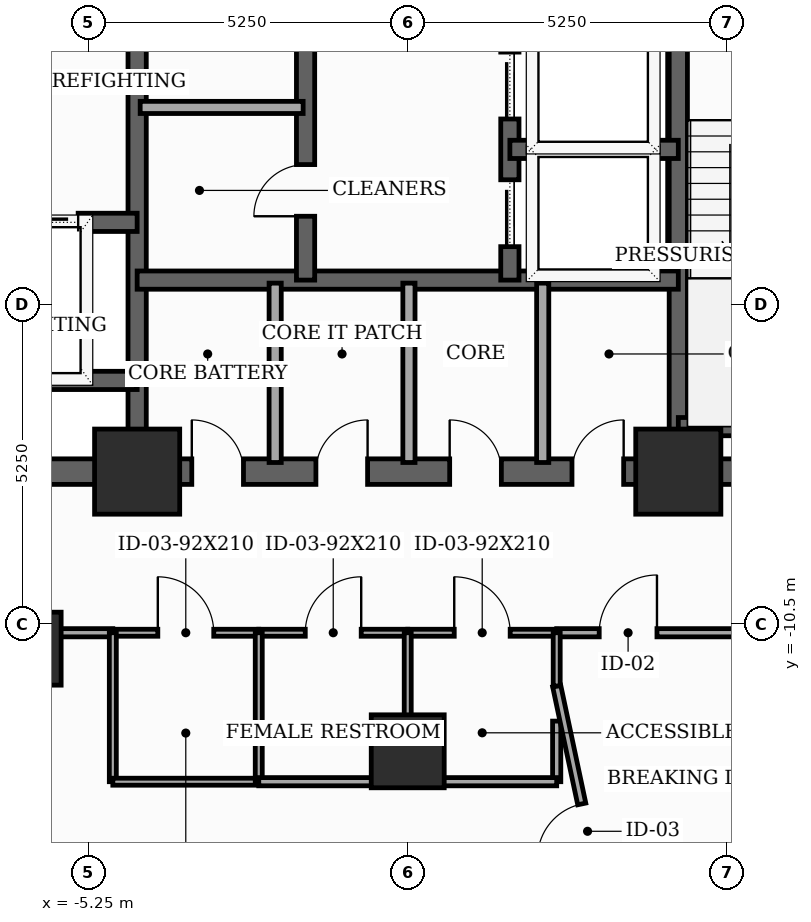
"""IFC4 building model, lengths in metres.
Left out: names, types, materials, properties, quantities, classifications, styles, units other than length and angle.
Written with IfcOpenShell. Run it as: python <this file> out.ifc"""

import sys

from ifc_helpers import new_model, si_unit, direction, frame, frame_2d, origin, origin_2d, place, context, subcontext, project, spatial, rectangle, extrude, element, fill, save


model = new_model("IFC4")
c1 = context("Model", 3, precision=1e-05, world=origin(), true_north=direction((0.0, 1.0)))
c2 = subcontext(c1, "Body", "Model", "MODEL_VIEW")
j1 = project(units=[si_unit("LENGTHUNIT", "METRE"), si_unit("PLANEANGLEUNIT", "RADIAN")], contexts=[c1])
p1 = place(None, origin())
s1 = spatial("IfcSite", under=j1, at=p1, CompositionType="ELEMENT")
p2 = place(p1, origin())
s2 = spatial("IfcBuilding", under=s1, at=p2, CompositionType="ELEMENT")
p3 = place(p2, frame((0.0, 0.0, 145.8)))
s3 = spatial("IfcBuildingStorey", under=s2, at=p3, CompositionType="ELEMENT", Elevation=145.8)
for number, where, z_axis, x_axis in (
    (1, (-4.45, -8.0, 0.0), (0.0, 0.0, 1.0), (1.0, 0.0, 0.0)),
    (2, (4.45, -8.0, 0.0), (0.0, 0.0, 1.0), (1.0, 0.0, 0.0)),
):
    element("IfcColumn", number, at=place(p3, frame(where, z_axis=z_axis, x_axis=x_axis)), inside=s3, PredefinedType="COLUMN", context=c2, shape_type="SweptSolid", body=[
        extrude(rectangle(XDim=1.4, YDim=1.4, at=origin_2d()), origin(), (0.0, 0.0, 1.0), 3.7),
    ])
for number, where, z_axis, x_axis in (
    (3, (-6.3, -10.912, 0.0), (0.0, 0.0, 1.0), (1.0, 0.0, 0.0)),
    (4, (0.0, -12.6, 0.0), (0.0, 0.0, 1.0), (1.0, 0.0, 0.0)),
):
    element("IfcColumn", number, at=place(p3, frame(where, z_axis=z_axis, x_axis=x_axis)), inside=s3, PredefinedType="COLUMN", context=c2, shape_type="SweptSolid", body=[
        extrude(rectangle(XDim=1.2, YDim=1.2, at=origin_2d()), origin(), (0.0, 0.0, 1.0), 3.7),
    ])
p4 = place(p3, frame((-8.0, -8.0, 0.0), z_axis=(0.0, 0.0, 1.0), x_axis=(1.0, 0.0, 0.0)))
e5 = element("IfcWall", 5, at=p4, inside=s3, PredefinedType="SHEAR", context=c2, shape_type="SweptSolid", body=[
    extrude(rectangle(XDim=16.0, YDim=0.42, at=frame_2d((8.0, 0.0))), origin(), (0.0, 0.0, 1.0), 3.46),
])
p5 = place(p4, frame((4.449, 0.0, 0.0)))
e6 = element("IfcOpeningElement", 6, at=p5, cuts=e5, PredefinedType="OPENING", context=c2, shape_type="SweptSolid", body=[
    extrude(rectangle(XDim=0.85, YDim=2.02, at=frame_2d((0.425, 1.01))), frame((0.0, 0.22, 0.0), z_axis=(0.0, -1.0, 0.0), x_axis=(1.0, 0.0, 0.0)), (0.0, 0.0, 1.0), 0.44),
])
p6 = place(p4, frame((6.49, 0.0, 0.0)))
e7 = element("IfcOpeningElement", 7, at=p6, cuts=e5, PredefinedType="OPENING", context=c2, shape_type="SweptSolid", body=[
    extrude(rectangle(XDim=0.85, YDim=2.02, at=frame_2d((0.425, 1.01))), frame((0.0, 0.22, 0.0), z_axis=(0.0, -1.0, 0.0), x_axis=(1.0, 0.0, 0.0)), (0.0, 0.0, 1.0), 0.44),
])
p7 = place(p4, frame((8.69, 0.0, 0.0)))
e8 = element("IfcOpeningElement", 8, at=p7, cuts=e5, PredefinedType="OPENING", context=c2, shape_type="SweptSolid", body=[
    extrude(rectangle(XDim=0.85, YDim=2.02, at=frame_2d((0.425, 1.01))), frame((0.0, 0.22, 0.0), z_axis=(0.0, -1.0, 0.0), x_axis=(1.0, 0.0, 0.0)), (0.0, 0.0, 1.0), 0.44),
])
p8 = place(p4, frame((10.701, 0.0, 0.0)))
e9 = element("IfcOpeningElement", 9, at=p8, cuts=e5, PredefinedType="OPENING", context=c2, shape_type="SweptSolid", body=[
    extrude(rectangle(XDim=0.85, YDim=2.02, at=frame_2d((0.425, 1.01))), frame((0.0, 0.22, 0.0), z_axis=(0.0, -1.0, 0.0), x_axis=(1.0, 0.0, 0.0)), (0.0, 0.0, 1.0), 0.44),
])
for number, where, z_axis, x_axis in (
    (10, (-4.45, -7.79, 0.0), (0.0, 0.0, 1.0), (0.0, 1.0, 0.0)),
    (11, (4.45, -7.79, 0.0), (0.0, 0.0, 1.0), (0.0, 1.0, 0.0)),
):
    element("IfcWall", number, at=place(p3, frame(where, z_axis=z_axis, x_axis=x_axis)), inside=s3, PredefinedType="SHEAR", context=c2, shape_type="SweptSolid", body=[
        extrude(rectangle(XDim=15.58, YDim=0.3, at=frame_2d((7.79, 0.0))), origin(), (0.0, 0.0, 1.0), 3.46),
    ])
p9 = place(p3, frame((4.45, -7.26, 0.0), z_axis=(0.0, 0.0, 1.0), x_axis=(1.0, 0.0, 0.0)))
e12 = element("IfcWall", 12, at=p9, inside=s3, PredefinedType="SHEAR", context=c2, shape_type="SweptSolid", body=[
    extrude(rectangle(XDim=3.55, YDim=0.3, at=frame_2d((1.775, 0.0))), origin(), (0.0, 0.0, 1.0), 3.46),
])
p10 = place(p3, frame((-7.79, -3.9, 0.0), z_axis=(0.0, 0.0, 1.0), x_axis=(1.0, 0.0, 0.0)))
e13 = element("IfcWall", 13, at=p10, inside=s3, PredefinedType="SHEAR", context=c2, shape_type="SweptSolid", body=[
    extrude(rectangle(XDim=3.34, YDim=0.3, at=frame_2d((1.67, 0.0))), origin(), (0.0, 0.0, 1.0), 3.46),
])
p11 = place(p10, frame((1.27, 0.0, 0.0)))
e14 = element("IfcOpeningElement", 14, at=p11, cuts=e13, PredefinedType="OPENING", context=c2, shape_type="SweptSolid", body=[
    extrude(rectangle(XDim=1.1, YDim=2.1, at=frame_2d((0.55, 1.05))), frame((0.0, 0.16, 0.0), z_axis=(0.0, -1.0, 0.0), x_axis=(1.0, 0.0, 0.0)), (0.0, 0.0, 1.0), 0.32),
])
p12 = place(p3, frame((-7.79, -6.5, 0.0), z_axis=(0.0, 0.0, 1.0), x_axis=(1.0, 0.0, 0.0)))
e15 = element("IfcWall", 15, at=p12, inside=s3, PredefinedType="SHEAR", context=c2, shape_type="SweptSolid", body=[
    extrude(rectangle(XDim=3.34, YDim=0.3, at=frame_2d((1.67, 0.0))), origin(), (0.0, 0.0, 1.0), 3.46),
])
p13 = place(p3, frame((-4.45, -4.85, 0.0), z_axis=(0.0, 0.0, 1.0), x_axis=(1.0, 0.0, 0.0)))
e16 = element("IfcWall", 16, at=p13, inside=s3, PredefinedType="SHEAR", context=c2, shape_type="SweptSolid", body=[
    extrude(rectangle(XDim=8.9, YDim=0.3, at=frame_2d((4.45, 0.0))), origin(), (0.0, 0.0, 1.0), 3.46),
])
p14 = place(p3, frame((-1.68, -4.85, 0.0), z_axis=(0.0, 0.0, 1.0), x_axis=(0.0, 1.0, 0.0)))
e17 = element("IfcWall", 17, at=p14, inside=s3, PredefinedType="SHEAR", context=c2, shape_type="SweptSolid", body=[
    extrude(rectangle(XDim=12.64, YDim=0.3, at=frame_2d((6.32, 0.0))), origin(), (0.0, 0.0, 1.0), 3.46),
])
p15 = place(p14, frame((1.05, 0.0, 0.0)))
e18 = element("IfcOpeningElement", 18, at=p15, cuts=e17, PredefinedType="OPENING", context=c2, shape_type="SweptSolid", body=[
    extrude(rectangle(XDim=0.85, YDim=2.02, at=frame_2d((0.425, 1.01))), frame((0.0, 0.16, 0.0), z_axis=(0.0, -1.0, 0.0), x_axis=(1.0, 0.0, 0.0)), (0.0, 0.0, 1.0), 0.32),
])
p16 = place(p14, frame((6.8, 0.0, 0.0)))
e19 = element("IfcOpeningElement", 19, at=p16, cuts=e17, PredefinedType="OPENING", context=c2, shape_type="SweptSolid", body=[
    extrude(rectangle(XDim=0.95, YDim=2.1, at=frame_2d((0.475, 1.05))), frame((0.0, 0.16, 0.0), z_axis=(0.0, -1.0, 0.0), x_axis=(1.0, 0.0, 0.0)), (0.0, 0.0, 1.0), 0.32),
])
p17 = place(p3, frame((1.68, -4.85, 0.0), z_axis=(0.0, 0.0, 1.0), x_axis=(0.0, 1.0, 0.0)))
e20 = element("IfcWall", 20, at=p17, inside=s3, PredefinedType="SHEAR", context=c2, shape_type="SweptSolid", body=[
    extrude(rectangle(XDim=12.64, YDim=0.3, at=frame_2d((6.32, 0.0))), origin(), (0.0, 0.0, 1.0), 3.46),
])
p18 = place(p17, frame((0.55, 0.0, 0.0)))
e21 = element("IfcOpeningElement", 21, at=p18, cuts=e20, PredefinedType="OPENING", context=c2, shape_type="SweptSolid", body=[
    extrude(rectangle(XDim=1.1, YDim=2.1, at=frame_2d((0.55, 1.05))), frame((0.0, 0.16, 0.0), z_axis=(0.0, -1.0, 0.0), x_axis=(1.0, 0.0, 0.0)), (0.0, 0.0, 1.0), 0.32),
])
p19 = place(p17, frame((2.65, 0.0, 0.0)))
e22 = element("IfcOpeningElement", 22, at=p19, cuts=e20, PredefinedType="OPENING", context=c2, shape_type="SweptSolid", body=[
    extrude(rectangle(XDim=1.1, YDim=2.1, at=frame_2d((0.55, 1.05))), frame((0.0, 0.16, 0.0), z_axis=(0.0, -1.0, 0.0), x_axis=(1.0, 0.0, 0.0)), (0.0, 0.0, 1.0), 0.32),
])
p20 = place(p17, frame((4.75, 0.0, 0.0)))
e23 = element("IfcOpeningElement", 23, at=p20, cuts=e20, PredefinedType="OPENING", context=c2, shape_type="SweptSolid", body=[
    extrude(rectangle(XDim=1.1, YDim=2.1, at=frame_2d((0.55, 1.05))), frame((0.0, 0.16, 0.0), z_axis=(0.0, -1.0, 0.0), x_axis=(1.0, 0.0, 0.0)), (0.0, 0.0, 1.0), 0.32),
])
p21 = place(p17, frame((6.85, 0.0, 0.0)))
e24 = element("IfcOpeningElement", 24, at=p21, cuts=e20, PredefinedType="OPENING", context=c2, shape_type="SweptSolid", body=[
    extrude(rectangle(XDim=1.1, YDim=2.1, at=frame_2d((0.55, 1.05))), frame((0.0, 0.16, 0.0), z_axis=(0.0, -1.0, 0.0), x_axis=(1.0, 0.0, 0.0)), (0.0, 0.0, 1.0), 0.32),
])
p22 = place(p17, frame((8.95, 0.0, 0.0)))
e25 = element("IfcOpeningElement", 25, at=p22, cuts=e20, PredefinedType="OPENING", context=c2, shape_type="SweptSolid", body=[
    extrude(rectangle(XDim=1.1, YDim=2.1, at=frame_2d((0.55, 1.05))), frame((0.0, 0.16, 0.0), z_axis=(0.0, -1.0, 0.0), x_axis=(1.0, 0.0, 0.0)), (0.0, 0.0, 1.0), 0.32),
])
p23 = place(p17, frame((11.05, 0.0, 0.0)))
e26 = element("IfcOpeningElement", 26, at=p23, cuts=e20, PredefinedType="OPENING", context=c2, shape_type="SweptSolid", body=[
    extrude(rectangle(XDim=1.1, YDim=2.1, at=frame_2d((0.55, 1.05))), frame((0.0, 0.16, 0.0), z_axis=(0.0, -1.0, 0.0), x_axis=(1.0, 0.0, 0.0)), (0.0, 0.0, 1.0), 0.32),
])
p24 = place(p3, frame((1.68, -2.7, 0.0), z_axis=(0.0, 0.0, 1.0), x_axis=(1.0, 0.0, 0.0)))
e27 = element("IfcWall", 27, at=p24, inside=s3, PredefinedType="SHEAR", context=c2, shape_type="SweptSolid", body=[
    extrude(rectangle(XDim=2.77, YDim=0.3, at=frame_2d((1.385, 0.0))), origin(), (0.0, 0.0, 1.0), 3.46),
])
for number, where, z_axis, x_axis in (
    (28, (-2.18, -7.85, 0.0), (0.0, 0.0, 1.0), (0.0, 1.0, 0.0)),
    (29, (0.02, -7.85, 0.0), (0.0, 0.0, 1.0), (0.0, 1.0, 0.0)),
    (30, (2.22, -7.85, 0.0), (0.0, 0.0, 1.0), (0.0, 1.0, 0.0)),
):
    element("IfcWall", number, at=place(p3, frame(where, z_axis=z_axis, x_axis=x_axis)), inside=s3, PredefinedType="SOLIDWALL", context=c2, shape_type="SweptSolid", body=[
        extrude(rectangle(XDim=2.95, YDim=0.2, at=frame_2d((1.475, 0.0))), origin(), (0.0, 0.0, 1.0), 2.845),
    ])
p25 = place(p3, frame((-4.4, -2.01, 0.0), z_axis=(0.0, 0.0, 1.0), x_axis=(1.0, 0.0, 0.0)))
e31 = element("IfcWall", 31, at=p25, inside=s3, PredefinedType="SOLIDWALL", context=c2, shape_type="SweptSolid", body=[
    extrude(rectangle(XDim=2.68, YDim=0.2, at=frame_2d((1.34, 0.0))), origin(), (0.0, 0.0, 1.0), 3.46),
])
p26 = place(p3, frame((-4.85, -10.65, 0.0), z_axis=(0.0, 0.0, 1.0), x_axis=(1.0, 0.0, 0.0)))
e32 = element("IfcWall", 32, at=p26, inside=s3, PredefinedType="PARTITIONING", context=c2, shape_type="SweptSolid", body=[
    extrude(rectangle(XDim=2.4, YDim=0.115, at=frame_2d((1.2, 0.0))), origin(), (0.0, 0.0, 1.0), 3.46),
])
p27 = place(p26, frame((0.74, 0.0, 0.0)))
e33 = element("IfcOpeningElement", 33, at=p27, cuts=e32, PredefinedType="OPENING", context=c2, shape_type="SweptSolid", body=[
    extrude(rectangle(XDim=0.92, YDim=2.1, at=frame_2d((0.46, 1.05))), frame((0.0, 0.067, 0.0), z_axis=(0.0, -1.0, 0.0), x_axis=(1.0, 0.0, 0.0)), (0.0, 0.0, 1.0), 0.135),
])
p28 = place(p3, frame((-6.149, -10.65, 0.0), z_axis=(0.0, 0.0, 1.0), x_axis=(1.0, 0.0, 0.0)))
e34 = element("IfcWall", 34, at=p28, inside=s3, PredefinedType="PARTITIONING", context=c2, shape_type="SweptSolid", body=[
    extrude(rectangle(XDim=1.299, YDim=0.135, at=frame_2d((0.649, 0.0))), origin(), (0.0, 0.0, 1.0), 3.46),
])
p29 = place(p3, frame((-2.45, -10.65, 0.0), z_axis=(0.0, 0.0, 1.0), x_axis=(1.0, 0.0, 0.0)))
e35 = element("IfcWall", 35, at=p29, inside=s3, PredefinedType="PARTITIONING", context=c2, shape_type="SweptSolid", body=[
    extrude(rectangle(XDim=2.45, YDim=0.115, at=frame_2d((1.225, 0.0))), origin(), (0.0, 0.0, 1.0), 2.745),
])
p30 = place(p29, frame((0.765, 0.0, 0.0)))
e36 = element("IfcOpeningElement", 36, at=p30, cuts=e35, PredefinedType="OPENING", context=c2, shape_type="SweptSolid", body=[
    extrude(rectangle(XDim=0.92, YDim=2.1, at=frame_2d((0.46, 1.05))), frame((0.0, 0.067, 0.0), z_axis=(0.0, -1.0, 0.0), x_axis=(1.0, 0.0, 0.0)), (0.0, 0.0, 1.0), 0.135),
])
p31 = place(p3, frame((0.0, -10.65, 0.0), z_axis=(0.0, 0.0, 1.0), x_axis=(1.0, 0.0, 0.0)))
e37 = element("IfcWall", 37, at=p31, inside=s3, PredefinedType="PARTITIONING", context=c2, shape_type="SweptSolid", body=[
    extrude(rectangle(XDim=2.45, YDim=0.115, at=frame_2d((1.225, 0.0))), origin(), (0.0, 0.0, 1.0), 3.46),
])
p32 = place(p31, frame((0.765, 0.0, 0.0)))
e38 = element("IfcOpeningElement", 38, at=p32, cuts=e37, PredefinedType="OPENING", context=c2, shape_type="SweptSolid", body=[
    extrude(rectangle(XDim=0.92, YDim=2.1, at=frame_2d((0.46, 1.05))), frame((0.0, 0.067, 0.0), z_axis=(0.0, -1.0, 0.0), x_axis=(1.0, 0.0, 0.0)), (0.0, 0.0, 1.0), 0.135),
])
p33 = place(p3, frame((2.45, -10.65, 0.0), z_axis=(0.0, 0.0, 1.0), x_axis=(1.0, 0.0, 0.0)))
e39 = element("IfcWall", 39, at=p33, inside=s3, PredefinedType="PARTITIONING", context=c2, shape_type="SweptSolid", body=[
    extrude(rectangle(XDim=5.871, YDim=0.135, at=frame_2d((2.936, 0.0))), origin(), (0.0, 0.0, 1.0), 2.045),
])
p34 = place(p33, frame((0.699, 0.0, 0.0)))
e40 = element("IfcOpeningElement", 40, at=p34, cuts=e39, PredefinedType="OPENING", context=c2, shape_type="SweptSolid", body=[
    extrude(rectangle(XDim=0.95, YDim=2.0, at=frame_2d((0.475, 1.0))), frame((0.0, 0.077, 0.0), z_axis=(0.0, -1.0, 0.0), x_axis=(1.0, 0.0, 0.0)), (0.0, 0.0, 1.0), 0.155),
])
p35 = place(p3, frame((-2.472, -15.605, 0.0), z_axis=(0.0, 0.0, 1.0), x_axis=(-0.938218989818, 0.34604208869, 0.0)))
e41 = element("IfcWall", 41, at=p35, inside=s3, PredefinedType="PARTITIONING", context=c2, shape_type="SweptSolid", body=[
    extrude(rectangle(XDim=5.745, YDim=0.135, at=frame_2d((2.873, 0.0))), origin(), (0.0, 0.0, 1.0), 3.46),
])
p36 = place(p3, frame((-4.85, -10.65, 0.0), z_axis=(0.0, 0.0, 1.0), x_axis=(0.0, -1.0, 0.0)))
e42 = element("IfcWall", 42, at=p36, inside=s3, PredefinedType="PARTITIONING", context=c2, shape_type="SweptSolid", body=[
    extrude(rectangle(XDim=2.45, YDim=0.115, at=frame_2d((1.225, 0.0))), origin(), (0.0, 0.0, 1.0), 2.745),
])
p37 = place(p3, frame((-4.85, -13.1, 0.0), z_axis=(0.0, 0.0, 1.0), x_axis=(1.0, 0.0, 0.0)))
e43 = element("IfcWall", 43, at=p37, inside=s3, PredefinedType="PARTITIONING", context=c2, shape_type="SweptSolid", body=[
    extrude(rectangle(XDim=2.4, YDim=0.115, at=frame_2d((1.2, 0.0))), origin(), (0.0, 0.0, 1.0), 3.46),
])
p38 = place(p3, frame((-2.45, -13.1, 0.0), z_axis=(0.0, 0.0, 1.0), x_axis=(0.0, 1.0, 0.0)))
e44 = element("IfcWall", 44, at=p38, inside=s3, PredefinedType="PARTITIONING", context=c2, shape_type="SweptSolid", body=[
    extrude(rectangle(XDim=2.45, YDim=0.115, at=frame_2d((1.225, 0.0))), origin(), (0.0, 0.0, 1.0), 2.745),
])
p39 = place(p3, frame((0.0, -13.1, 0.0), z_axis=(0.0, 0.0, 1.0), x_axis=(-1.0, 0.0, 0.0)))
e45 = element("IfcWall", 45, at=p39, inside=s3, PredefinedType="PARTITIONING", context=c2, shape_type="SweptSolid", body=[
    extrude(rectangle(XDim=2.45, YDim=0.135, at=frame_2d((1.225, 0.0))), origin(), (0.0, 0.0, 1.0), 2.045),
])
p40 = place(p3, frame((2.45, -12.103, 0.0), z_axis=(0.0, 0.0, 1.0), x_axis=(0.0, -1.0, 0.0)))
e46 = element("IfcWall", 46, at=p40, inside=s3, PredefinedType="PARTITIONING", context=c2, shape_type="SweptSolid", body=[
    extrude(rectangle(XDim=0.997, YDim=0.135, at=frame_2d((0.499, 0.0))), origin(), (0.0, 0.0, 1.0), 2.745),
])
p41 = place(p3, frame((2.45, -13.1, 0.0), z_axis=(0.0, 0.0, 1.0), x_axis=(-1.0, 0.0, 0.0)))
e47 = element("IfcWall", 47, at=p41, inside=s3, PredefinedType="PARTITIONING", context=c2, shape_type="SweptSolid", body=[
    extrude(rectangle(XDim=2.45, YDim=0.135, at=frame_2d((1.225, 0.0))), origin(), (0.0, 0.0, 1.0), 2.045),
])
p42 = place(p3, frame((3.269, -15.38, 0.0), z_axis=(0.0, 0.0, 1.0), x_axis=(-0.207886916666, 0.978152866314, 0.0)))
e48 = element("IfcWall", 48, at=p42, inside=s3, PredefinedType="PARTITIONING", context=c2, shape_type="SweptSolid", body=[
    extrude(rectangle(XDim=3.94, YDim=0.135, at=frame_2d((1.97, 0.0))), origin(), (0.0, 0.0, 1.0), 2.045),
])
p43 = place(p42, frame((1.037, 0.0, 0.0)))
e49 = element("IfcOpeningElement", 49, at=p43, cuts=e48, PredefinedType="OPENING", context=c2, shape_type="SweptSolid", body=[
    extrude(rectangle(XDim=0.92, YDim=2.0, at=frame_2d((0.46, 1.0))), frame((0.0, 0.077, 0.0), z_axis=(0.0, -1.0, 0.0), x_axis=(1.0, 0.0, 0.0)), (0.0, 0.0, 1.0), 0.155),
])
p44 = place(p3, frame((0.0, -13.1, 0.0), z_axis=(0.0, 0.0, 1.0), x_axis=(0.0, 1.0, 0.0)))
e50 = element("IfcWall", 50, at=p44, inside=s3, PredefinedType="PARTITIONING", context=c2, shape_type="SweptSolid", body=[
    extrude(rectangle(XDim=2.45, YDim=0.115, at=frame_2d((1.225, 0.0))), origin(), (0.0, 0.0, 1.0), 2.045),
])
p45 = place(p3, frame((2.45, -11.526, 0.0), z_axis=(0.0, 0.0, 1.0), x_axis=(0.0, 1.0, 0.0)))
e51 = element("IfcWall", 51, at=p45, inside=s3, PredefinedType="PARTITIONING", context=c2, shape_type="SweptSolid", body=[
    extrude(rectangle(XDim=0.876, YDim=0.115, at=frame_2d((0.438, 0.0))), origin(), (0.0, 0.0, 1.0), 3.46),
])
p46 = place(p5, origin())
e52 = element("IfcDoor", 52, at=p46, inside=s3, OperationType="SINGLE_SWING_LEFT", PredefinedType="TRAPDOOR", context=c2, shape_type="SweptSolid", body=[
    extrude(rectangle(XDim=0.85, YDim=2.02, at=frame_2d((0.425, 1.01))), frame((0.0, 0.025, 0.0), z_axis=(0.0, -1.0, 0.0), x_axis=(1.0, 0.0, 0.0)), (0.0, 0.0, 1.0), 0.05),
])
fill(e6, e52)
p47 = place(p6, origin())
e53 = element("IfcDoor", 53, at=p47, inside=s3, OperationType="SINGLE_SWING_RIGHT", PredefinedType="TRAPDOOR", context=c2, shape_type="SweptSolid", body=[
    extrude(rectangle(XDim=0.85, YDim=2.02, at=frame_2d((0.425, 1.01))), frame((0.0, 0.025, 0.0), z_axis=(0.0, -1.0, 0.0), x_axis=(1.0, 0.0, 0.0)), (0.0, 0.0, 1.0), 0.05),
])
fill(e7, e53)
p48 = place(p7, origin())
e54 = element("IfcDoor", 54, at=p48, inside=s3, OperationType="SINGLE_SWING_LEFT", PredefinedType="TRAPDOOR", context=c2, shape_type="SweptSolid", body=[
    extrude(rectangle(XDim=0.85, YDim=2.02, at=frame_2d((0.425, 1.01))), frame((0.0, 0.025, 0.0), z_axis=(0.0, -1.0, 0.0), x_axis=(1.0, 0.0, 0.0)), (0.0, 0.0, 1.0), 0.05),
])
fill(e8, e54)
p49 = place(p8, origin())
e55 = element("IfcDoor", 55, at=p49, inside=s3, OperationType="SINGLE_SWING_RIGHT", PredefinedType="TRAPDOOR", context=c2, shape_type="SweptSolid", body=[
    extrude(rectangle(XDim=0.85, YDim=2.02, at=frame_2d((0.425, 1.01))), frame((0.0, 0.025, 0.0), z_axis=(0.0, -1.0, 0.0), x_axis=(1.0, 0.0, 0.0)), (0.0, 0.0, 1.0), 0.05),
])
fill(e9, e55)
p50 = place(p11, origin())
e56 = element("IfcDoor", 56, at=p50, inside=s3, OperationType="SLIDING_TO_LEFT", PredefinedType="DOOR", context=c2, shape_type="SweptSolid", body=[
    extrude(rectangle(XDim=1.1, YDim=2.1, at=frame_2d((0.55, 1.05))), frame((0.0, 0.025, 0.0), z_axis=(0.0, -1.0, 0.0), x_axis=(1.0, 0.0, 0.0)), (0.0, 0.0, 1.0), 0.05),
])
fill(e14, e56)
p51 = place(p15, origin())
e57 = element("IfcDoor", 57, at=p51, inside=s3, OperationType="SINGLE_SWING_LEFT", PredefinedType="TRAPDOOR", context=c2, shape_type="SweptSolid", body=[
    extrude(rectangle(XDim=0.85, YDim=2.02, at=frame_2d((0.425, 1.01))), frame((0.0, 0.025, 0.0), z_axis=(0.0, -1.0, 0.0), x_axis=(1.0, 0.0, 0.0)), (0.0, 0.0, 1.0), 0.05),
])
fill(e18, e57)
p52 = place(p18, origin())
e58 = element("IfcDoor", 58, at=p52, inside=s3, OperationType="SLIDING_TO_LEFT", PredefinedType="DOOR", context=c2, shape_type="SweptSolid", body=[
    extrude(rectangle(XDim=1.1, YDim=2.1, at=frame_2d((0.55, 1.05))), frame((0.0, 0.025, 0.0), z_axis=(0.0, -1.0, 0.0), x_axis=(1.0, 0.0, 0.0)), (0.0, 0.0, 1.0), 0.05),
])
fill(e21, e58)
p53 = place(p19, origin())
e59 = element("IfcDoor", 59, at=p53, inside=s3, OperationType="SLIDING_TO_LEFT", PredefinedType="DOOR", context=c2, shape_type="SweptSolid", body=[
    extrude(rectangle(XDim=1.1, YDim=2.1, at=frame_2d((0.55, 1.05))), frame((0.0, 0.025, 0.0), z_axis=(0.0, -1.0, 0.0), x_axis=(1.0, 0.0, 0.0)), (0.0, 0.0, 1.0), 0.05),
])
fill(e22, e59)
p54 = place(p27, origin())
e60 = element("IfcDoor", 60, at=p54, inside=s3, OperationType="SINGLE_SWING_LEFT", PredefinedType="DOOR", context=c2, shape_type="SweptSolid", body=[
    extrude(rectangle(XDim=0.92, YDim=2.1, at=frame_2d((0.46, 1.05))), frame((0.0, 0.025, 0.0), z_axis=(0.0, -1.0, 0.0), x_axis=(1.0, 0.0, 0.0)), (0.0, 0.0, 1.0), 0.05),
])
fill(e33, e60)
p55 = place(p30, origin())
e61 = element("IfcDoor", 61, at=p55, inside=s3, OperationType="SINGLE_SWING_RIGHT", PredefinedType="DOOR", context=c2, shape_type="SweptSolid", body=[
    extrude(rectangle(XDim=0.92, YDim=2.1, at=frame_2d((0.46, 1.05))), frame((0.0, 0.025, 0.0), z_axis=(0.0, -1.0, 0.0), x_axis=(1.0, 0.0, 0.0)), (0.0, 0.0, 1.0), 0.05),
])
fill(e36, e61)
p56 = place(p32, origin())
e62 = element("IfcDoor", 62, at=p56, inside=s3, OperationType="SINGLE_SWING_LEFT", PredefinedType="DOOR", context=c2, shape_type="SweptSolid", body=[
    extrude(rectangle(XDim=0.92, YDim=2.1, at=frame_2d((0.46, 1.05))), frame((0.0, 0.025, 0.0), z_axis=(0.0, -1.0, 0.0), x_axis=(1.0, 0.0, 0.0)), (0.0, 0.0, 1.0), 0.05),
])
fill(e38, e62)
p57 = place(p34, origin())
e63 = element("IfcDoor", 63, at=p57, inside=s3, OperationType="SINGLE_SWING_RIGHT", PredefinedType="DOOR", context=c2, shape_type="SweptSolid", body=[
    extrude(rectangle(XDim=0.95, YDim=2.0, at=frame_2d((0.475, 1.0))), frame((0.0, 0.025, 0.0), z_axis=(0.0, -1.0, 0.0), x_axis=(1.0, 0.0, 0.0)), (0.0, 0.0, 1.0), 0.05),
])
fill(e40, e63)
p58 = place(p43, origin())
e64 = element("IfcDoor", 64, at=p58, inside=s3, OperationType="SINGLE_SWING_LEFT", PredefinedType="DOOR", context=c2, shape_type="SweptSolid", body=[
    extrude(rectangle(XDim=0.92, YDim=2.0, at=frame_2d((0.46, 1.0))), frame((0.0, 0.025, 0.0), z_axis=(0.0, -1.0, 0.0), x_axis=(1.0, 0.0, 0.0)), (0.0, 0.0, 1.0), 0.05),
])
fill(e49, e64)
save(model, sys.argv[1])
